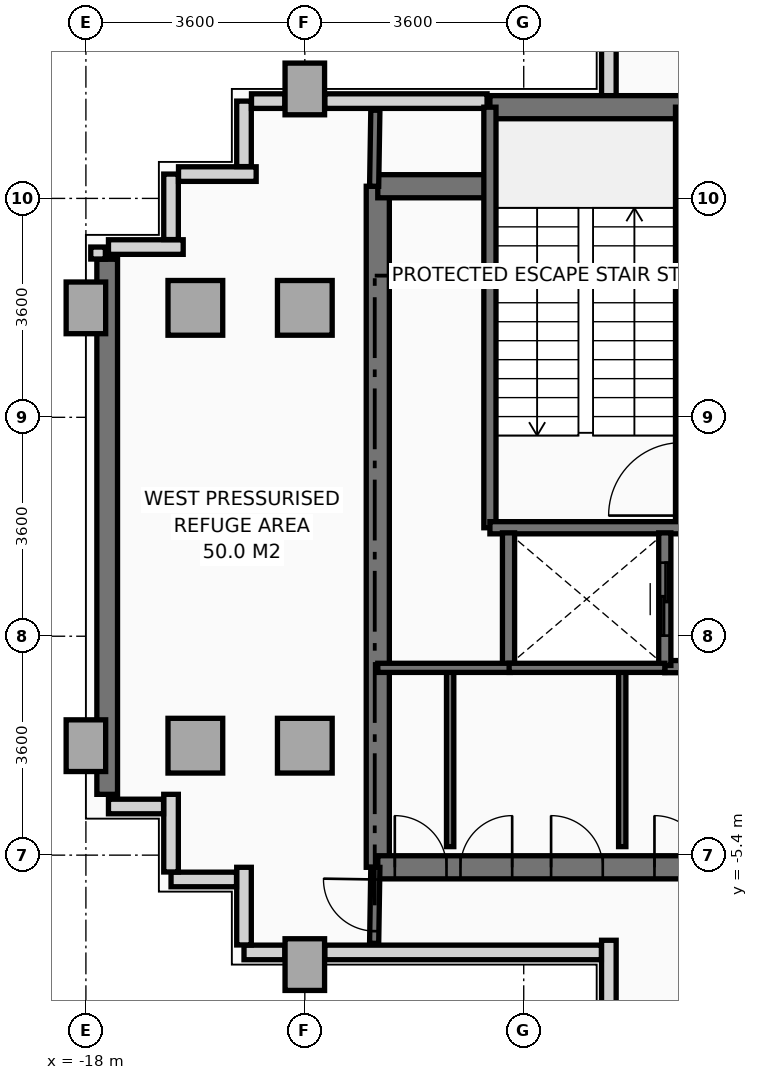
"""IFC4 building model, lengths in metres.
Left out: names, types, materials, properties, quantities, classifications, styles, units other than length and angle.
Written with IfcOpenShell. Run it as: python <this file> out.ifc"""

import sys

from ifc_helpers import new_model, si_unit, direction, frame, frame_2d, origin, origin_2d, place, context, subcontext, project, spatial, rectangle, extrude, source, transform, mapped, element, fill, save


model = new_model("IFC4")
c1 = context("Model", 3, precision=1e-05, world=origin(), true_north=direction((0.0, 1.0)))
c2 = subcontext(c1, "Body", "Model", "MODEL_VIEW")
j1 = project(units=[si_unit("LENGTHUNIT", "METRE"), si_unit("PLANEANGLEUNIT", "RADIAN")], contexts=[c1])
p1 = place(None, origin())
s1 = spatial("IfcSite", under=j1, at=p1, CompositionType="ELEMENT")
p2 = place(p1, origin())
s2 = spatial("IfcBuilding", under=s1, at=p2, CompositionType="ELEMENT")
p3 = place(p2, frame((0.0, 0.0, 214.8)))
s3 = spatial("IfcBuildingStorey", under=s2, at=p3, CompositionType="ELEMENT", Elevation=214.8)
m1 = source(origin(), c2, "Body", "SweptSolid", [
    extrude(rectangle(XDim=0.65, YDim=0.85, at=origin_2d()), origin(), (0.0, 0.0, 1.0), 4.41),
])
for number, where, z_axis, x_axis in (
    (1, (-18.0, -3.6, 0.0), (0.0, 0.0, 1.0), (1.0, 0.0, 0.0)),
    (2, (-18.0, 3.6, 0.0), (0.0, 0.0, 1.0), (1.0, 0.0, 0.0)),
):
    element("IfcColumn", number, at=place(p3, frame(where, z_axis=z_axis, x_axis=x_axis)), inside=s3, PredefinedType="COLUMN", context=c2, shape_type="MappedRepresentation", body=[
        mapped(m1, transform((0.0, 0.0, 0.0), x_axis=(1.0, 0.0, 0.0), y_axis=(0.0, 1.0, 0.0), z_axis=(0.0, 0.0, 1.0), scale=1.0)),
    ])
m2 = source(origin(), c2, "Body", "SweptSolid", [
    extrude(rectangle(XDim=0.9, YDim=0.9, at=origin_2d()), origin(), (0.0, 0.0, 1.0), 4.41),
])
for number, where, z_axis, x_axis in (
    (3, (-16.2, -3.6, 0.0), (0.0, 0.0, 1.0), (1.0, 0.0, 0.0)),
    (4, (-16.2, 3.6, 0.0), (0.0, 0.0, 1.0), (1.0, 0.0, 0.0)),
):
    element("IfcColumn", number, at=place(p3, frame(where, z_axis=z_axis, x_axis=x_axis)), inside=s3, PredefinedType="COLUMN", context=c2, shape_type="MappedRepresentation", body=[
        mapped(m2, transform((0.0, 0.0, 0.0), x_axis=(1.0, 0.0, 0.0), y_axis=(0.0, 1.0, 0.0), z_axis=(0.0, 0.0, 1.0), scale=1.0)),
    ])
p4 = place(p3, frame((-14.4, -7.2, 0.0), z_axis=(0.0, 0.0, 1.0), x_axis=(1.0, 0.0, 0.0)))
e5 = element("IfcColumn", 5, at=p4, inside=s3, PredefinedType="COLUMN", context=c2, shape_type="MappedRepresentation", body=[
    mapped(m1, transform((0.0, 0.0, 0.0), x_axis=(1.0, 0.0, 0.0), y_axis=(0.0, 1.0, 0.0), z_axis=(0.0, 0.0, 1.0), scale=1.0)),
])
for number, where, z_axis, x_axis in (
    (6, (-14.4, -3.6, 0.0), (0.0, 0.0, 1.0), (1.0, 0.0, 0.0)),
    (7, (-14.4, 3.6, 0.0), (0.0, 0.0, 1.0), (1.0, 0.0, 0.0)),
):
    element("IfcColumn", number, at=place(p3, frame(where, z_axis=z_axis, x_axis=x_axis)), inside=s3, PredefinedType="COLUMN", context=c2, shape_type="MappedRepresentation", body=[
        mapped(m2, transform((0.0, 0.0, 0.0), x_axis=(1.0, 0.0, 0.0), y_axis=(0.0, 1.0, 0.0), z_axis=(0.0, 0.0, 1.0), scale=1.0)),
    ])
p5 = place(p3, frame((-14.4, 7.2, 0.0), z_axis=(0.0, 0.0, 1.0), x_axis=(1.0, 0.0, 0.0)))
e8 = element("IfcColumn", 8, at=p5, inside=s3, PredefinedType="COLUMN", context=c2, shape_type="MappedRepresentation", body=[
    mapped(m1, transform((0.0, 0.0, 0.0), x_axis=(1.0, 0.0, 0.0), y_axis=(0.0, 1.0, 0.0), z_axis=(0.0, 0.0, 1.0), scale=1.0)),
])
p6 = place(p3, frame((-17.65, -4.4, 0.0), z_axis=(0.0, 0.0, 1.0), x_axis=(0.0, 1.0, 0.0)))
e9 = element("IfcWall", 9, at=p6, inside=s3, PredefinedType="SOLIDWALL", context=c2, shape_type="SweptSolid", body=[
    extrude(rectangle(XDim=8.8, YDim=0.34, at=frame_2d((4.4, 0.0))), origin(), (0.0, 0.0, 1.0), 3.76),
])
p7 = place(p3, frame((-9.4, -8.547, 0.0), z_axis=(0.0, 0.0, 1.0), x_axis=(0.0, 1.0, 0.0)))
e10 = element("IfcWall", 10, at=p7, inside=s3, PredefinedType="PARAPET", context=c2, shape_type="SweptSolid", body=[
    extrude(rectangle(XDim=1.747, YDim=0.24, at=frame_2d((0.874, 0.0))), origin(), (0.0, 0.0, 1.0), 1.15),
])
p8 = place(p3, frame((-9.523, -7.0, 0.0), z_axis=(0.0, 0.0, 1.0), x_axis=(-1.0, 0.0, 0.0)))
e11 = element("IfcWall", 11, at=p8, inside=s3, PredefinedType="PARAPET", context=c2, shape_type="SweptSolid", body=[
    extrude(rectangle(XDim=4.549, YDim=0.24, at=frame_2d((2.274, 0.0))), origin(), (0.0, 0.0, 1.0), 1.15),
])
p9 = place(p3, frame((-14.728, -7.0, 0.0), z_axis=(0.0, 0.0, 1.0), x_axis=(-1.0, 0.0, 0.0)))
e12 = element("IfcWall", 12, at=p9, inside=s3, PredefinedType="PARAPET", context=c2, shape_type="SweptSolid", body=[
    extrude(rectangle(XDim=0.672, YDim=0.24, at=frame_2d((0.336, 0.0))), origin(), (0.0, 0.0, 1.0), 1.15),
])
p10 = place(p3, frame((-15.4, -6.877, 0.0), z_axis=(0.0, 0.0, 1.0), x_axis=(0.0, 1.0, 0.0)))
e13 = element("IfcWall", 13, at=p10, inside=s3, PredefinedType="PARAPET", context=c2, shape_type="SweptSolid", body=[
    extrude(rectangle(XDim=1.277, YDim=0.24, at=frame_2d((0.638, 0.0))), origin(), (0.0, 0.0, 1.0), 1.15),
])
p11 = place(p3, frame((-15.523, -5.8, 0.0), z_axis=(0.0, 0.0, 1.0), x_axis=(-1.0, 0.0, 0.0)))
e14 = element("IfcWall", 14, at=p11, inside=s3, PredefinedType="PARAPET", context=c2, shape_type="SweptSolid", body=[
    extrude(rectangle(XDim=1.077, YDim=0.24, at=frame_2d((0.539, 0.0))), origin(), (0.0, 0.0, 1.0), 1.15),
])
p12 = place(p3, frame((-16.6, -5.677, 0.0), z_axis=(0.0, 0.0, 1.0), x_axis=(0.0, 1.0, 0.0)))
e15 = element("IfcWall", 15, at=p12, inside=s3, PredefinedType="PARAPET", context=c2, shape_type="SweptSolid", body=[
    extrude(rectangle(XDim=1.277, YDim=0.24, at=frame_2d((0.639, 0.0))), origin(), (0.0, 0.0, 1.0), 1.15),
])
p13 = place(p3, frame((-16.723, -4.6, 0.0), z_axis=(0.0, 0.0, 1.0), x_axis=(-1.0, 0.0, 0.0)))
e16 = element("IfcWall", 16, at=p13, inside=s3, PredefinedType="PARAPET", context=c2, shape_type="SweptSolid", body=[
    extrude(rectangle(XDim=0.906, YDim=0.24, at=frame_2d((0.453, 0.0))), origin(), (0.0, 0.0, 1.0), 1.15),
])
p14 = place(p3, frame((-17.8, 4.403, 0.0), z_axis=(0.0, 0.0, 1.0), x_axis=(0.0, 1.0, 0.0)))
e17 = element("IfcWall", 17, at=p14, inside=s3, PredefinedType="PARAPET", context=c2, shape_type="SweptSolid", body=[
    extrude(rectangle(XDim=0.197, YDim=0.24, at=frame_2d((0.099, 0.0))), origin(), (0.0, 0.0, 1.0), 1.15),
])
p15 = place(p3, frame((-17.629, 4.6, 0.0), z_axis=(0.0, 0.0, 1.0), x_axis=(1.0, 0.0, 0.0)))
e18 = element("IfcWall", 18, at=p15, inside=s3, PredefinedType="PARAPET", context=c2, shape_type="SweptSolid", body=[
    extrude(rectangle(XDim=1.229, YDim=0.24, at=frame_2d((0.615, 0.0))), origin(), (0.0, 0.0, 1.0), 1.15),
])
p16 = place(p3, frame((-16.6, 4.723, 0.0), z_axis=(0.0, 0.0, 1.0), x_axis=(0.0, 1.0, 0.0)))
e19 = element("IfcWall", 19, at=p16, inside=s3, PredefinedType="PARAPET", context=c2, shape_type="SweptSolid", body=[
    extrude(rectangle(XDim=1.077, YDim=0.24, at=frame_2d((0.539, 0.0))), origin(), (0.0, 0.0, 1.0), 1.15),
])
p17 = place(p3, frame((-16.477, 5.8, 0.0), z_axis=(0.0, 0.0, 1.0), x_axis=(1.0, 0.0, 0.0)))
e20 = element("IfcWall", 20, at=p17, inside=s3, PredefinedType="PARAPET", context=c2, shape_type="SweptSolid", body=[
    extrude(rectangle(XDim=1.277, YDim=0.24, at=frame_2d((0.639, 0.0))), origin(), (0.0, 0.0, 1.0), 1.15),
])
p18 = place(p3, frame((-15.4, 5.923, 0.0), z_axis=(0.0, 0.0, 1.0), x_axis=(0.0, 1.0, 0.0)))
e21 = element("IfcWall", 21, at=p18, inside=s3, PredefinedType="PARAPET", context=c2, shape_type="SweptSolid", body=[
    extrude(rectangle(XDim=1.077, YDim=0.24, at=frame_2d((0.539, 0.0))), origin(), (0.0, 0.0, 1.0), 1.15),
])
p19 = place(p3, frame((-15.277, 7.0, 0.0), z_axis=(0.0, 0.0, 1.0), x_axis=(1.0, 0.0, 0.0)))
e22 = element("IfcWall", 22, at=p19, inside=s3, PredefinedType="PARAPET", context=c2, shape_type="SweptSolid", body=[
    extrude(rectangle(XDim=0.549, YDim=0.24, at=frame_2d((0.274, 0.0))), origin(), (0.0, 0.0, 1.0), 1.15),
])
p20 = place(p3, frame((-14.072, 7.0, 0.0), z_axis=(0.0, 0.0, 1.0), x_axis=(1.0, 0.0, 0.0)))
e23 = element("IfcWall", 23, at=p20, inside=s3, PredefinedType="PARAPET", context=c2, shape_type="SweptSolid", body=[
    extrude(rectangle(XDim=2.669, YDim=0.24, at=frame_2d((1.334, 0.0))), origin(), (0.0, 0.0, 1.0), 1.15),
])
p21 = place(p3, frame((-9.4, 6.953, 0.0), z_axis=(0.0, 0.0, 1.0), x_axis=(0.0, 1.0, 0.0)))
e24 = element("IfcWall", 24, at=p21, inside=s3, PredefinedType="PARAPET", context=c2, shape_type="SweptSolid", body=[
    extrude(rectangle(XDim=1.594, YDim=0.24, at=frame_2d((0.797, 0.0))), origin(), (0.0, 0.0, 1.0), 1.15),
])
p22 = place(p3, frame((-13.2, -5.6, 0.0), z_axis=(0.0, 0.0, 1.0), x_axis=(0.0, 1.0, 0.0)))
e25 = element("IfcWall", 25, at=p22, inside=s3, PredefinedType="SHEAR", context=c2, shape_type="SweptSolid", body=[
    extrude(rectangle(XDim=11.2, YDim=0.38, at=frame_2d((5.6, 0.0))), origin(), (0.0, 0.0, 1.0), 4.41),
])
p23 = place(p3, frame((-11.356, 6.9, 0.0), z_axis=(0.0, 0.0, 1.0), x_axis=(1.0, 0.0, 0.0)))
e26 = element("IfcWall", 26, at=p23, inside=s3, PredefinedType="SHEAR", context=c2, shape_type="SweptSolid", body=[
    extrude(rectangle(XDim=5.956, YDim=0.38, at=frame_2d((2.978, 0.0))), origin(), (0.0, 0.0, 1.0), 4.41),
])
p24 = place(p3, frame((-13.2, 5.6, 0.0), z_axis=(0.0, 0.0, 1.0), x_axis=(1.0, 0.0, 0.0)))
e27 = element("IfcWall", 27, at=p24, inside=s3, PredefinedType="SHEAR", context=c2, shape_type="SweptSolid", body=[
    extrude(rectangle(XDim=1.844, YDim=0.38, at=frame_2d((0.922, 0.0))), origin(), (0.0, 0.0, 1.0), 4.41),
])
p25 = place(p3, frame((-13.2, -5.6, 0.0), z_axis=(0.0, 0.0, 1.0), x_axis=(1.0, 0.0, 0.0)))
e28 = element("IfcWall", 28, at=p25, inside=s3, PredefinedType="SHEAR", context=c2, shape_type="SweptSolid", body=[
    extrude(rectangle(XDim=7.8, YDim=0.38, at=frame_2d((3.9, 0.0))), origin(), (0.0, 0.0, 1.0), 4.41),
])
p26 = place(p25, frame((0.28, 0.0, 0.0)))
e29 = element("IfcOpeningElement", 29, at=p26, cuts=e28, PredefinedType="OPENING", context=c2, shape_type="SweptSolid", body=[
    extrude(rectangle(XDim=0.85, YDim=2.1, at=frame_2d((0.425, 1.05))), frame((0.0, 0.2, 0.0), z_axis=(0.0, -1.0, 0.0), x_axis=(1.0, 0.0, 0.0)), (0.0, 0.0, 1.0), 0.4),
])
p27 = place(p25, frame((1.36, 0.0, 0.0)))
e30 = element("IfcOpeningElement", 30, at=p27, cuts=e28, PredefinedType="OPENING", context=c2, shape_type="SweptSolid", body=[
    extrude(rectangle(XDim=0.85, YDim=2.1, at=frame_2d((0.425, 1.05))), frame((0.0, 0.2, 0.0), z_axis=(0.0, -1.0, 0.0), x_axis=(1.0, 0.0, 0.0)), (0.0, 0.0, 1.0), 0.4),
])
p28 = place(p25, frame((2.85, 0.0, 0.0)))
e31 = element("IfcOpeningElement", 31, at=p28, cuts=e28, PredefinedType="OPENING", context=c2, shape_type="SweptSolid", body=[
    extrude(rectangle(XDim=0.85, YDim=2.1, at=frame_2d((0.425, 1.05))), frame((0.0, 0.2, 0.0), z_axis=(0.0, -1.0, 0.0), x_axis=(1.0, 0.0, 0.0)), (0.0, 0.0, 1.0), 0.4),
])
p29 = place(p25, frame((4.55, 0.0, 0.0)))
e32 = element("IfcOpeningElement", 32, at=p29, cuts=e28, PredefinedType="OPENING", context=c2, shape_type="SweptSolid", body=[
    extrude(rectangle(XDim=0.85, YDim=2.1, at=frame_2d((0.425, 1.05))), frame((0.0, 0.2, 0.0), z_axis=(0.0, -1.0, 0.0), x_axis=(1.0, 0.0, 0.0)), (0.0, 0.0, 1.0), 0.4),
])
p30 = place(p25, frame((6.25, 0.0, 0.0)))
e33 = element("IfcOpeningElement", 33, at=p30, cuts=e28, PredefinedType="OPENING", context=c2, shape_type="SweptSolid", body=[
    extrude(rectangle(XDim=0.85, YDim=2.1, at=frame_2d((0.425, 1.05))), frame((0.0, 0.2, 0.0), z_axis=(0.0, -1.0, 0.0), x_axis=(1.0, 0.0, 0.0)), (0.0, 0.0, 1.0), 0.4),
])
p31 = place(p3, frame((-8.48, -2.3, 0.0), z_axis=(0.0, 0.0, 1.0), x_axis=(1.0, 0.0, 0.0)))
e34 = element("IfcWall", 34, at=p31, inside=s3, PredefinedType="SOLIDWALL", context=c2, shape_type="SweptSolid", body=[
    extrude(rectangle(XDim=3.08, YDim=0.2, at=frame_2d((1.54, 0.0))), origin(), (0.0, 0.0, 1.0), 4.41),
])
p32 = place(p3, frame((-8.204, -0.016, 0.0), z_axis=(0.0, 0.0, 1.0), x_axis=(0.0, 1.0, 0.0)))
e35 = element("IfcWall", 35, at=p32, inside=s3, PredefinedType="SOLIDWALL", context=c2, shape_type="SweptSolid", body=[
    extrude(rectangle(XDim=6.916, YDim=0.2, at=frame_2d((3.458, 0.0))), origin(), (0.0, 0.0, 1.0), 4.41),
])
p33 = place(p32, frame((0.2, 0.0, 0.0)))
e36 = element("IfcOpeningElement", 36, at=p33, cuts=e35, PredefinedType="OPENING", context=c2, shape_type="SweptSolid", body=[
    extrude(rectangle(XDim=1.2, YDim=2.2, at=frame_2d((0.6, 1.1))), frame((0.0, 0.11, 0.0), z_axis=(0.0, -1.0, 0.0), x_axis=(1.0, 0.0, 0.0)), (0.0, 0.0, 1.0), 0.22),
])
p34 = place(p3, frame((-11.356, -0.016, 0.0), z_axis=(0.0, 0.0, 1.0), x_axis=(0.0, 1.0, 0.0)))
e37 = element("IfcWall", 37, at=p34, inside=s3, PredefinedType="SOLIDWALL", context=c2, shape_type="SweptSolid", body=[
    extrude(rectangle(XDim=6.916, YDim=0.2, at=frame_2d((3.458, 0.0))), origin(), (0.0, 0.0, 1.0), 4.41),
])
p35 = place(p3, frame((-11.356, -0.016, 0.0), z_axis=(0.0, 0.0, 1.0), x_axis=(1.0, 0.0, 0.0)))
e38 = element("IfcWall", 38, at=p35, inside=s3, PredefinedType="SOLIDWALL", context=c2, shape_type="SweptSolid", body=[
    extrude(rectangle(XDim=3.152, YDim=0.2, at=frame_2d((1.576, 0.0))), origin(), (0.0, 0.0, 1.0), 4.41),
])
p36 = place(p3, frame((-11.05, -2.28, 0.0), z_axis=(0.0, 0.0, 1.0), x_axis=(0.0, 1.0, 0.0)))
e39 = element("IfcWall", 39, at=p36, inside=s3, PredefinedType="SOLIDWALL", context=c2, shape_type="SweptSolid", body=[
    extrude(rectangle(XDim=2.18, YDim=0.2, at=frame_2d((1.09, 0.0))), origin(), (0.0, 0.0, 1.0), 4.41),
])
p37 = place(p3, frame((-8.48, -2.28, 0.0), z_axis=(0.0, 0.0, 1.0), x_axis=(0.0, 1.0, 0.0)))
e40 = element("IfcWall", 40, at=p37, inside=s3, PredefinedType="SOLIDWALL", context=c2, shape_type="SweptSolid", body=[
    extrude(rectangle(XDim=2.18, YDim=0.2, at=frame_2d((1.09, 0.0))), origin(), (0.0, 0.0, 1.0), 4.41),
])
p38 = place(p37, frame((0.49, 0.0, 0.0)))
e41 = element("IfcOpeningElement", 41, at=p38, cuts=e40, PredefinedType="OPENING", context=c2, shape_type="SweptSolid", body=[
    extrude(rectangle(XDim=1.2, YDim=2.2, at=frame_2d((0.6, 1.1))), frame((0.0, 0.11, 0.0), z_axis=(0.0, -1.0, 0.0), x_axis=(1.0, 0.0, 0.0)), (0.0, 0.0, 1.0), 0.22),
])
p39 = place(p3, frame((-12.01, -5.26, 0.0), z_axis=(0.0, 0.0, 1.0), x_axis=(0.0, 1.0, 0.0)))
e42 = element("IfcWall", 42, at=p39, inside=s3, PredefinedType="PARTITIONING", context=c2, shape_type="SweptSolid", body=[
    extrude(rectangle(XDim=2.94, YDim=0.12, at=frame_2d((1.47, 0.0))), origin(), (0.0, 0.0, 1.0), 4.41),
])
p40 = place(p3, frame((-13.2, -2.32, 0.0), z_axis=(0.0, 0.0, 1.0), x_axis=(1.0, 0.0, 0.0)))
e43 = element("IfcWall", 43, at=p40, inside=s3, PredefinedType="PARTITIONING", context=c2, shape_type="SweptSolid", body=[
    extrude(rectangle(XDim=2.18, YDim=0.15, at=frame_2d((1.09, 0.0))), origin(), (0.0, 0.0, 1.0), 4.41),
])
p41 = place(p3, frame((-9.18, -5.26, 0.0), z_axis=(0.0, 0.0, 1.0), x_axis=(0.0, 1.0, 0.0)))
e44 = element("IfcWall", 44, at=p41, inside=s3, PredefinedType="PARTITIONING", context=c2, shape_type="SweptSolid", body=[
    extrude(rectangle(XDim=2.94, YDim=0.12, at=frame_2d((1.47, 0.0))), origin(), (0.0, 0.0, 1.0), 4.41),
])
p42 = place(p3, frame((-11.04, -2.32, 0.0), z_axis=(0.0, 0.0, 1.0), x_axis=(1.0, 0.0, 0.0)))
e45 = element("IfcWall", 45, at=p42, inside=s3, PredefinedType="PARTITIONING", context=c2, shape_type="SweptSolid", body=[
    extrude(rectangle(XDim=2.56, YDim=0.15, at=frame_2d((1.28, 0.0))), origin(), (0.0, 0.0, 1.0), 4.41),
])
p43 = place(p3, frame((-13.26, -6.85, 0.0), z_axis=(0.0, 0.0, 1.0), x_axis=(0.016013571389, 0.999871774545, 0.0)))
e46 = element("IfcWall", 46, at=p43, inside=s3, PredefinedType="PARTITIONING", context=c2, shape_type="SweptSolid", body=[
    extrude(rectangle(XDim=1.25, YDim=0.15, at=frame_2d((0.625, 0.0))), origin(), (0.0, 0.0, 1.0), 4.41),
])
p44 = place(p43, frame((0.2, 0.0, 0.0)))
e47 = element("IfcOpeningElement", 47, at=p44, cuts=e46, PredefinedType="OPENING", context=c2, shape_type="SweptSolid", body=[
    extrude(rectangle(XDim=0.85, YDim=2.1, at=frame_2d((0.425, 1.05))), frame((0.0, 0.085, 0.0), z_axis=(0.0, -1.0, 0.0), x_axis=(1.0, 0.0, 0.0)), (0.0, 0.0, 1.0), 0.17),
])
p45 = place(p3, frame((-13.26, 5.6, 0.0), z_axis=(0.0, 0.0, 1.0), x_axis=(0.016013571389, 0.999871774545, 0.0)))
e48 = element("IfcWall", 48, at=p45, inside=s3, PredefinedType="PARTITIONING", context=c2, shape_type="SweptSolid", body=[
    extrude(rectangle(XDim=1.25, YDim=0.15, at=frame_2d((0.625, 0.0))), origin(), (0.0, 0.0, 1.0), 4.41),
])
m3 = source(origin(), c2, "Body", "SweptSolid", [
    extrude(rectangle(XDim=0.85, YDim=2.1, at=frame_2d((0.425, 1.05))), frame((0.0, 0.025, 0.0), z_axis=(0.0, -1.0, 0.0), x_axis=(1.0, 0.0, 0.0)), (0.0, 0.0, 1.0), 0.05),
])
p46 = place(p26, origin())
e49 = element("IfcDoor", 49, at=p46, inside=s3, OperationType="SINGLE_SWING_LEFT", PredefinedType="DOOR", context=c2, shape_type="MappedRepresentation", body=[
    mapped(m3, transform((0.0, 0.0, 0.0), x_axis=(1.0, 0.0, 0.0), y_axis=(0.0, 1.0, 0.0), z_axis=(0.0, 0.0, 1.0), scale=1.0)),
])
fill(e29, e49)
p47 = place(p27, origin())
e50 = element("IfcDoor", 50, at=p47, inside=s3, OperationType="SINGLE_SWING_RIGHT", PredefinedType="DOOR", context=c2, shape_type="MappedRepresentation", body=[
    mapped(m3, transform((0.0, 0.0, 0.0), x_axis=(1.0, 0.0, 0.0), y_axis=(0.0, 1.0, 0.0), z_axis=(0.0, 0.0, 1.0), scale=1.0)),
])
fill(e30, e50)
p48 = place(p28, origin())
e51 = element("IfcDoor", 51, at=p48, inside=s3, OperationType="SINGLE_SWING_LEFT", PredefinedType="DOOR", context=c2, shape_type="MappedRepresentation", body=[
    mapped(m3, transform((0.0, 0.0, 0.0), x_axis=(1.0, 0.0, 0.0), y_axis=(0.0, 1.0, 0.0), z_axis=(0.0, 0.0, 1.0), scale=1.0)),
])
fill(e31, e51)
p49 = place(p29, origin())
e52 = element("IfcDoor", 52, at=p49, inside=s3, OperationType="SINGLE_SWING_LEFT", PredefinedType="DOOR", context=c2, shape_type="MappedRepresentation", body=[
    mapped(m3, transform((0.0, 0.0, 0.0), x_axis=(1.0, 0.0, 0.0), y_axis=(0.0, 1.0, 0.0), z_axis=(0.0, 0.0, 1.0), scale=1.0)),
])
fill(e32, e52)
m4 = source(origin(), c2, "Body", "SweptSolid", [
    extrude(rectangle(XDim=1.2, YDim=2.2, at=frame_2d((0.6, 1.1))), frame((0.0, 0.025, 0.0), z_axis=(0.0, -1.0, 0.0), x_axis=(1.0, 0.0, 0.0)), (0.0, 0.0, 1.0), 0.05),
])
p50 = place(p38, origin())
e53 = element("IfcDoor", 53, at=p50, inside=s3, OperationType="SLIDING_TO_RIGHT", PredefinedType="DOOR", context=c2, shape_type="MappedRepresentation", body=[
    mapped(m4, transform((0.0, 0.0, 0.0), x_axis=(1.0, 0.0, 0.0), y_axis=(0.0, 1.0, 0.0), z_axis=(0.0, 0.0, 1.0), scale=1.0)),
])
fill(e41, e53)
p51 = place(p44, origin())
e54 = element("IfcDoor", 54, at=p51, inside=s3, OperationType="SINGLE_SWING_RIGHT", PredefinedType="DOOR", context=c2, shape_type="MappedRepresentation", body=[
    mapped(m3, transform((0.0, 0.0, 0.0), x_axis=(1.0, 0.0, 0.0), y_axis=(0.0, 1.0, 0.0), z_axis=(0.0, 0.0, 1.0), scale=1.0)),
])
fill(e47, e54)
save(model, sys.argv[1])
